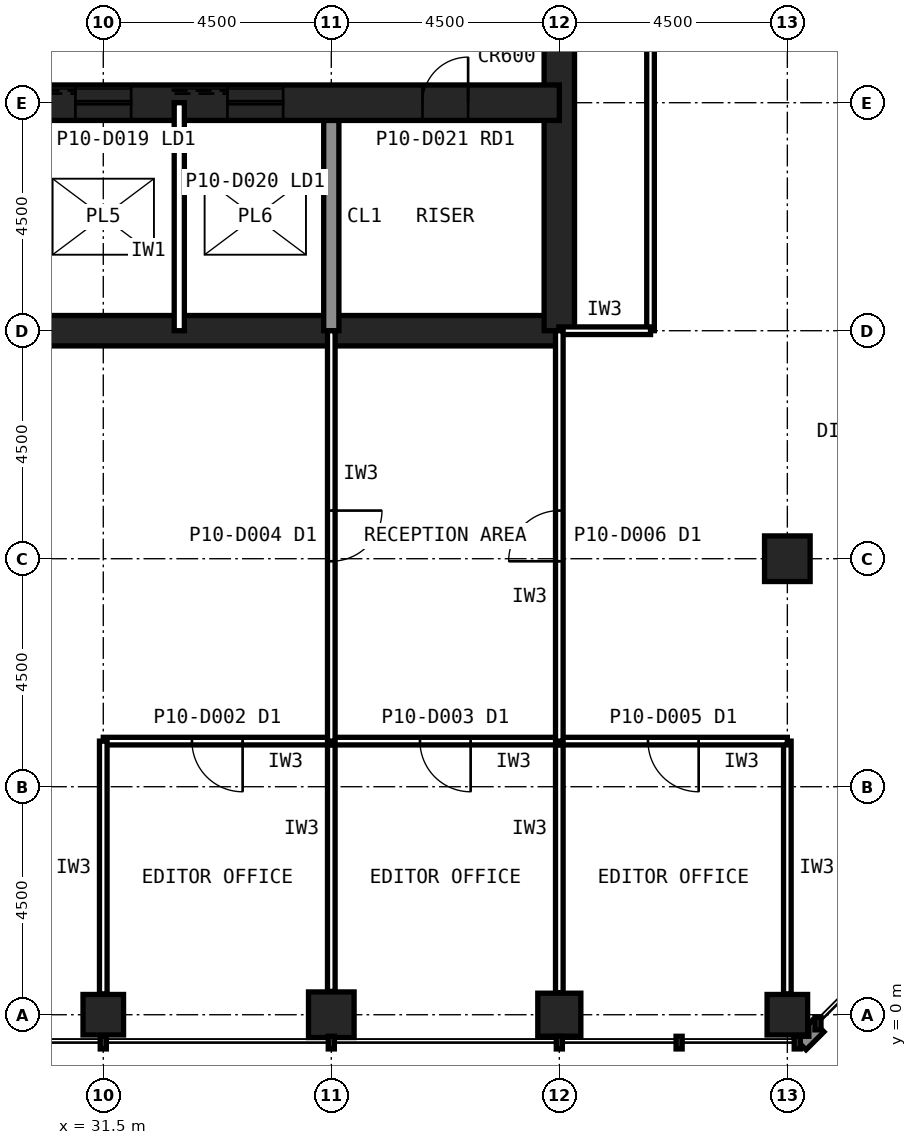
"""IFC4 building model, lengths in metres.
Left out: names, types, materials, properties, quantities, classifications, styles, units other than length and angle.
Written with IfcOpenShell. Run it as: python <this file> out.ifc"""

import sys

from ifc_helpers import new_model, si_unit, direction, frame, frame_2d, origin, origin_2d, place, context, subcontext, project, spatial, rectangle, hollow_rectangle, extrude, element, fill, save


model = new_model("IFC4")
c1 = context("Model", 3, precision=1e-05, world=origin(), true_north=direction((0.0, 1.0)))
c2 = subcontext(c1, "Body", "Model", "MODEL_VIEW")
j1 = project(units=[si_unit("LENGTHUNIT", "METRE"), si_unit("PLANEANGLEUNIT", "RADIAN")], contexts=[c1])
p1 = place(None, origin())
s1 = spatial("IfcSite", under=j1, at=p1, CompositionType="ELEMENT")
p2 = place(p1, origin())
s2 = spatial("IfcBuilding", under=s1, at=p2, CompositionType="ELEMENT")
p3 = place(p2, frame((0.0, 0.0, 45.8)))
s3 = spatial("IfcBuildingStorey", under=s2, at=p3, CompositionType="ELEMENT", Elevation=45.8)
p4 = place(p3, frame((31.5, 0.0, 0.0), z_axis=(0.0, 0.0, 1.0), x_axis=(1.0, 0.0, 0.0)))
e1 = element("IfcColumn", 1, at=p4, inside=s3, PredefinedType="COLUMN", context=c2, shape_type="SweptSolid", body=[
    extrude(hollow_rectangle(XDim=0.8, YDim=0.8, WallThickness=0.045, at=origin_2d()), origin(), (0.0, 0.0, 1.0), 4.2),
])
p5 = place(p3, frame((36.0, 0.0, 0.0), z_axis=(0.0, 0.0, 1.0), x_axis=(1.0, 0.0, 0.0)))
e2 = element("IfcColumn", 2, at=p5, inside=s3, PredefinedType="COLUMN", context=c2, shape_type="SweptSolid", body=[
    extrude(hollow_rectangle(XDim=0.9, YDim=0.9, WallThickness=0.063, at=origin_2d()), origin(), (0.0, 0.0, 1.0), 4.2),
])
p6 = place(p3, frame((40.5, 0.0, 0.0), z_axis=(0.0, 0.0, 1.0), x_axis=(1.0, 0.0, 0.0)))
e3 = element("IfcColumn", 3, at=p6, inside=s3, PredefinedType="COLUMN", context=c2, shape_type="SweptSolid", body=[
    extrude(hollow_rectangle(XDim=0.85, YDim=0.85, WallThickness=0.05, at=origin_2d()), origin(), (0.0, 0.0, 1.0), 4.2),
])
p7 = place(p3, frame((45.0, 0.0, 0.0), z_axis=(0.0, 0.0, 1.0), x_axis=(1.0, 0.0, 0.0)))
e4 = element("IfcColumn", 4, at=p7, inside=s3, PredefinedType="COLUMN", context=c2, shape_type="SweptSolid", body=[
    extrude(hollow_rectangle(XDim=0.8, YDim=0.8, WallThickness=0.045, at=origin_2d()), origin(), (0.0, 0.0, 1.0), 4.2),
])
p8 = place(p3, frame((45.0, 9.0, 0.0), z_axis=(0.0, 0.0, 1.0), x_axis=(1.0, 0.0, 0.0)))
e5 = element("IfcColumn", 5, at=p8, inside=s3, PredefinedType="COLUMN", context=c2, shape_type="SweptSolid", body=[
    extrude(hollow_rectangle(XDim=0.9, YDim=0.9, WallThickness=0.063, at=origin_2d()), origin(), (0.0, 0.0, 1.0), 4.2),
])
p9 = place(p3, frame((13.5, 13.5, 0.0), z_axis=(0.0, 0.0, 1.0), x_axis=(1.0, 0.0, 0.0)))
e6 = element("IfcWall", 6, at=p9, inside=s3, PredefinedType="SHEAR", context=c2, shape_type="SweptSolid", body=[
    extrude(rectangle(XDim=27.0, YDim=0.6, at=frame_2d((13.5, 0.0))), origin(), (0.0, 0.0, 1.0), 4.2),
])
p10 = place(p3, frame((40.5, 13.5, 0.0), z_axis=(0.0, 0.0, 1.0), x_axis=(0.0, 1.0, 0.0)))
e7 = element("IfcWall", 7, at=p10, inside=s3, PredefinedType="SHEAR", context=c2, shape_type="SweptSolid", body=[
    extrude(rectangle(XDim=27.0, YDim=0.6, at=frame_2d((13.5, 0.0))), origin(), (0.0, 0.0, 1.0), 4.2),
])
p11 = place(p10, frame((5.85, 0.0, 0.0)))
e8 = element("IfcOpeningElement", 8, at=p11, cuts=e7, PredefinedType="OPENING", context=c2, shape_type="SweptSolid", body=[
    extrude(rectangle(XDim=1.8, YDim=2.1, at=frame_2d((0.9, 1.05))), frame((0.0, 0.31, 0.0), z_axis=(0.0, -1.0, 0.0), x_axis=(1.0, 0.0, 0.0)), (0.0, 0.0, 1.0), 0.62),
])
p12 = place(p10, frame((19.65, 0.0, 0.0)))
e9 = element("IfcOpeningElement", 9, at=p12, cuts=e7, PredefinedType="OPENING", context=c2, shape_type="SweptSolid", body=[
    extrude(rectangle(XDim=1.2, YDim=2.1, at=frame_2d((0.6, 1.05))), frame((0.0, 0.31, 0.0), z_axis=(0.0, -1.0, 0.0), x_axis=(1.0, 0.0, 0.0)), (0.0, 0.0, 1.0), 0.62),
])
p13 = place(p3, frame((36.0, 13.5, 0.0), z_axis=(0.0, 0.0, 1.0), x_axis=(0.0, 1.0, 0.0)))
e10 = element("IfcWall", 10, at=p13, inside=s3, PredefinedType="SOLIDWALL", context=c2, shape_type="SweptSolid", body=[
    extrude(rectangle(XDim=4.5, YDim=0.3, at=frame_2d((2.25, 0.0))), origin(), (0.0, 0.0, 1.0), 4.04),
])
p14 = place(p3, frame((13.5, 18.0, 0.0), z_axis=(0.0, 0.0, 1.0), x_axis=(1.0, 0.0, 0.0)))
e11 = element("IfcWall", 11, at=p14, inside=s3, PredefinedType="SHEAR", context=c2, shape_type="SweptSolid", body=[
    extrude(rectangle(XDim=27.0, YDim=0.7, at=frame_2d((13.5, 0.0))), origin(), (0.0, 0.0, 1.0), 4.2),
])
p15 = place(p14, frame((24.3, 0.0, 0.0)))
e12 = element("IfcOpeningElement", 12, at=p15, cuts=e11, PredefinedType="OPENING", context=c2, shape_type="SweptSolid", body=[
    extrude(rectangle(XDim=0.9, YDim=2.1, at=frame_2d((0.45, 1.05))), frame((0.0, 0.36, 0.0), z_axis=(0.0, -1.0, 0.0), x_axis=(1.0, 0.0, 0.0)), (0.0, 0.0, 1.0), 0.72),
])
p16 = place(p14, frame((5.45, 0.0, 0.0)))
e13 = element("IfcOpeningElement", 13, at=p16, cuts=e11, PredefinedType="OPENING", context=c2, shape_type="SweptSolid", body=[
    extrude(rectangle(XDim=1.1, YDim=2.1, at=frame_2d((0.55, 1.05))), frame((0.0, 0.36, 0.0), z_axis=(0.0, -1.0, 0.0), x_axis=(1.0, 0.0, 0.0)), (0.0, 0.0, 1.0), 0.72),
])
p17 = place(p14, frame((8.45, 0.0, 0.0)))
e14 = element("IfcOpeningElement", 14, at=p17, cuts=e11, PredefinedType="OPENING", context=c2, shape_type="SweptSolid", body=[
    extrude(rectangle(XDim=1.1, YDim=2.1, at=frame_2d((0.55, 1.05))), frame((0.0, 0.36, 0.0), z_axis=(0.0, -1.0, 0.0), x_axis=(1.0, 0.0, 0.0)), (0.0, 0.0, 1.0), 0.72),
])
p18 = place(p14, frame((11.45, 0.0, 0.0)))
e15 = element("IfcOpeningElement", 15, at=p18, cuts=e11, PredefinedType="OPENING", context=c2, shape_type="SweptSolid", body=[
    extrude(rectangle(XDim=1.1, YDim=2.1, at=frame_2d((0.55, 1.05))), frame((0.0, 0.36, 0.0), z_axis=(0.0, -1.0, 0.0), x_axis=(1.0, 0.0, 0.0)), (0.0, 0.0, 1.0), 0.72),
])
p19 = place(p14, frame((14.45, 0.0, 0.0)))
e16 = element("IfcOpeningElement", 16, at=p19, cuts=e11, PredefinedType="OPENING", context=c2, shape_type="SweptSolid", body=[
    extrude(rectangle(XDim=1.1, YDim=2.1, at=frame_2d((0.55, 1.05))), frame((0.0, 0.36, 0.0), z_axis=(0.0, -1.0, 0.0), x_axis=(1.0, 0.0, 0.0)), (0.0, 0.0, 1.0), 0.72),
])
p20 = place(p14, frame((17.45, 0.0, 0.0)))
e17 = element("IfcOpeningElement", 17, at=p20, cuts=e11, PredefinedType="OPENING", context=c2, shape_type="SweptSolid", body=[
    extrude(rectangle(XDim=1.1, YDim=2.1, at=frame_2d((0.55, 1.05))), frame((0.0, 0.36, 0.0), z_axis=(0.0, -1.0, 0.0), x_axis=(1.0, 0.0, 0.0)), (0.0, 0.0, 1.0), 0.72),
])
p21 = place(p14, frame((20.45, 0.0, 0.0)))
e18 = element("IfcOpeningElement", 18, at=p21, cuts=e11, PredefinedType="OPENING", context=c2, shape_type="SweptSolid", body=[
    extrude(rectangle(XDim=1.1, YDim=2.1, at=frame_2d((0.55, 1.05))), frame((0.0, 0.36, 0.0), z_axis=(0.0, -1.0, 0.0), x_axis=(1.0, 0.0, 0.0)), (0.0, 0.0, 1.0), 0.72),
])
p22 = place(p14, frame((1.6, 0.0, 0.0)))
e19 = element("IfcOpeningElement", 19, at=p22, cuts=e11, PredefinedType="OPENING", context=c2, shape_type="SweptSolid", body=[
    extrude(rectangle(XDim=1.3, YDim=2.2, at=frame_2d((0.65, 1.1))), frame((0.0, 0.36, 0.0), z_axis=(0.0, -1.0, 0.0), x_axis=(1.0, 0.0, 0.0)), (0.0, 0.0, 1.0), 0.72),
])
p23 = place(p3, frame((33.0, 13.5, 0.0), z_axis=(0.0, 0.0, 1.0), x_axis=(0.0, 1.0, 0.0)))
e20 = element("IfcWall", 20, at=p23, inside=s3, PredefinedType="PARTITIONING", context=c2, shape_type="SweptSolid", body=[
    extrude(rectangle(XDim=4.5, YDim=0.2, at=frame_2d((2.25, 0.0))), origin(), (0.0, 0.0, 1.0), 4.04),
])
p24 = place(p3, frame((42.3, 13.5, 0.0), z_axis=(0.0, 0.0, 1.0), x_axis=(0.0, 1.0, 0.0)))
e21 = element("IfcWall", 21, at=p24, inside=s3, PredefinedType="PARTITIONING", context=c2, shape_type="SweptSolid", body=[
    extrude(rectangle(XDim=28.8, YDim=0.15, at=frame_2d((14.4, 0.0))), origin(), (0.0, 0.0, 1.0), 4.04),
])
p25 = place(p24, frame((13.9, 0.0, 0.0)))
e22 = element("IfcOpeningElement", 22, at=p25, cuts=e21, PredefinedType="OPENING", context=c2, shape_type="SweptSolid", body=[
    extrude(rectangle(XDim=1.0, YDim=2.1, at=frame_2d((0.5, 1.05))), frame((0.0, 0.085, 0.0), z_axis=(0.0, -1.0, 0.0), x_axis=(1.0, 0.0, 0.0)), (0.0, 0.0, 1.0), 0.17),
])
p26 = place(p3, frame((40.49, 13.5, 0.0), z_axis=(0.0, 0.0, 1.0), x_axis=(1.0, 0.0, 0.0)))
e23 = element("IfcWall", 23, at=p26, inside=s3, PredefinedType="PARTITIONING", context=c2, shape_type="SweptSolid", body=[
    extrude(rectangle(XDim=1.81, YDim=0.15, at=frame_2d((0.905, 0.0))), origin(), (0.0, 0.0, 1.0), 3.189),
])
p27 = place(p3, frame((36.0, 0.46, 0.0), z_axis=(0.0, 0.0, 1.0), x_axis=(0.0, 1.0, 0.0)))
e24 = element("IfcWall", 24, at=p27, inside=s3, PredefinedType="PARTITIONING", context=c2, shape_type="SweptSolid", body=[
    extrude(rectangle(XDim=4.94, YDim=0.15, at=frame_2d((2.47, 0.0))), origin(), (0.0, 0.0, 1.0), 3.189),
])
p28 = place(p3, frame((36.0, 5.4, 0.0), z_axis=(0.0, 0.0, 1.0), x_axis=(-1.0, 0.0, 0.0)))
e25 = element("IfcWall", 25, at=p28, inside=s3, PredefinedType="PARTITIONING", context=c2, shape_type="SweptSolid", body=[
    extrude(rectangle(XDim=4.5, YDim=0.15, at=frame_2d((2.25, 0.0))), origin(), (0.0, 0.0, 1.0), 4.04),
])
p29 = place(p28, frame((1.75, 0.0, 0.0)))
e26 = element("IfcOpeningElement", 26, at=p29, cuts=e25, PredefinedType="OPENING", context=c2, shape_type="SweptSolid", body=[
    extrude(rectangle(XDim=1.0, YDim=2.1, at=frame_2d((0.5, 1.05))), frame((0.0, 0.085, 0.0), z_axis=(0.0, -1.0, 0.0), x_axis=(1.0, 0.0, 0.0)), (0.0, 0.0, 1.0), 0.17),
])
p30 = place(p3, frame((31.5, 5.4, 0.0), z_axis=(0.0, 0.0, 1.0), x_axis=(0.0, -1.0, 0.0)))
e27 = element("IfcWall", 27, at=p30, inside=s3, PredefinedType="PARTITIONING", context=c2, shape_type="SweptSolid", body=[
    extrude(rectangle(XDim=4.99, YDim=0.15, at=frame_2d((2.495, 0.0))), origin(), (0.0, 0.0, 1.0), 3.189),
])
p31 = place(p3, frame((40.5, 0.435, 0.0), z_axis=(0.0, 0.0, 1.0), x_axis=(0.0, 1.0, 0.0)))
e28 = element("IfcWall", 28, at=p31, inside=s3, PredefinedType="PARTITIONING", context=c2, shape_type="SweptSolid", body=[
    extrude(rectangle(XDim=4.965, YDim=0.15, at=frame_2d((2.482, 0.0))), origin(), (0.0, 0.0, 1.0), 3.189),
])
p32 = place(p3, frame((40.5, 5.4, 0.0), z_axis=(0.0, 0.0, 1.0), x_axis=(-1.0, 0.0, 0.0)))
e29 = element("IfcWall", 29, at=p32, inside=s3, PredefinedType="PARTITIONING", context=c2, shape_type="SweptSolid", body=[
    extrude(rectangle(XDim=4.5, YDim=0.15, at=frame_2d((2.25, 0.0))), origin(), (0.0, 0.0, 1.0), 4.04),
])
p33 = place(p32, frame((1.75, 0.0, 0.0)))
e30 = element("IfcOpeningElement", 30, at=p33, cuts=e29, PredefinedType="OPENING", context=c2, shape_type="SweptSolid", body=[
    extrude(rectangle(XDim=1.0, YDim=2.1, at=frame_2d((0.5, 1.05))), frame((0.0, 0.085, 0.0), z_axis=(0.0, -1.0, 0.0), x_axis=(1.0, 0.0, 0.0)), (0.0, 0.0, 1.0), 0.17),
])
p34 = place(p3, frame((45.0, 0.41, 0.0), z_axis=(0.0, 0.0, 1.0), x_axis=(0.0, 1.0, 0.0)))
e31 = element("IfcWall", 31, at=p34, inside=s3, PredefinedType="PARTITIONING", context=c2, shape_type="SweptSolid", body=[
    extrude(rectangle(XDim=4.99, YDim=0.15, at=frame_2d((2.495, 0.0))), origin(), (0.0, 0.0, 1.0), 3.429),
])
p35 = place(p3, frame((45.0, 5.4, 0.0), z_axis=(0.0, 0.0, 1.0), x_axis=(-1.0, 0.0, 0.0)))
e32 = element("IfcWall", 32, at=p35, inside=s3, PredefinedType="PARTITIONING", context=c2, shape_type="SweptSolid", body=[
    extrude(rectangle(XDim=4.5, YDim=0.15, at=frame_2d((2.25, 0.0))), origin(), (0.0, 0.0, 1.0), 4.04),
])
p36 = place(p35, frame((1.75, 0.0, 0.0)))
e33 = element("IfcOpeningElement", 33, at=p36, cuts=e32, PredefinedType="OPENING", context=c2, shape_type="SweptSolid", body=[
    extrude(rectangle(XDim=1.0, YDim=2.1, at=frame_2d((0.5, 1.05))), frame((0.0, 0.085, 0.0), z_axis=(0.0, -1.0, 0.0), x_axis=(1.0, 0.0, 0.0)), (0.0, 0.0, 1.0), 0.17),
])
p37 = place(p3, frame((40.5, 5.4, 0.0), z_axis=(0.0, 0.0, 1.0), x_axis=(0.0, 1.0, 0.0)))
e34 = element("IfcWall", 34, at=p37, inside=s3, PredefinedType="PARTITIONING", context=c2, shape_type="SweptSolid", body=[
    extrude(rectangle(XDim=8.1, YDim=0.15, at=frame_2d((4.05, 0.0))), origin(), (0.0, 0.0, 1.0), 3.189),
])
p38 = place(p37, frame((3.55, 0.0, 0.0)))
e35 = element("IfcOpeningElement", 35, at=p38, cuts=e34, PredefinedType="OPENING", context=c2, shape_type="SweptSolid", body=[
    extrude(rectangle(XDim=1.0, YDim=2.1, at=frame_2d((0.5, 1.05))), frame((0.0, 0.085, 0.0), z_axis=(0.0, -1.0, 0.0), x_axis=(1.0, 0.0, 0.0)), (0.0, 0.0, 1.0), 0.17),
])
p39 = place(p3, frame((36.0, 13.5, 0.0), z_axis=(0.0, 0.0, 1.0), x_axis=(0.0, -1.0, 0.0)))
e36 = element("IfcWall", 36, at=p39, inside=s3, PredefinedType="PARTITIONING", context=c2, shape_type="SweptSolid", body=[
    extrude(rectangle(XDim=8.1, YDim=0.15, at=frame_2d((4.05, 0.0))), origin(), (0.0, 0.0, 1.0), 3.189),
])
p40 = place(p39, frame((3.55, 0.0, 0.0)))
e37 = element("IfcOpeningElement", 37, at=p40, cuts=e36, PredefinedType="OPENING", context=c2, shape_type="SweptSolid", body=[
    extrude(rectangle(XDim=1.0, YDim=2.1, at=frame_2d((0.5, 1.05))), frame((0.0, 0.085, 0.0), z_axis=(0.0, -1.0, 0.0), x_axis=(1.0, 0.0, 0.0)), (0.0, 0.0, 1.0), 0.17),
])
p41 = place(p15, origin())
e38 = element("IfcDoor", 38, at=p41, inside=s3, OperationType="SINGLE_SWING_RIGHT", PredefinedType="DOOR", context=c2, shape_type="SweptSolid", body=[
    extrude(rectangle(XDim=0.9, YDim=2.1, at=frame_2d((0.45, 1.05))), frame((0.0, 0.025, 0.0), z_axis=(0.0, -1.0, 0.0), x_axis=(1.0, 0.0, 0.0)), (0.0, 0.0, 1.0), 0.05),
])
fill(e12, e38)
p42 = place(p20, origin())
e39 = element("IfcDoor", 39, at=p42, inside=s3, OperationType="SLIDING_TO_LEFT", PredefinedType="DOOR", context=c2, shape_type="SweptSolid", body=[
    extrude(rectangle(XDim=1.1, YDim=2.1, at=frame_2d((0.55, 1.05))), frame((0.0, 0.025, 0.0), z_axis=(0.0, -1.0, 0.0), x_axis=(1.0, 0.0, 0.0)), (0.0, 0.0, 1.0), 0.05),
])
fill(e17, e39)
p43 = place(p21, origin())
e40 = element("IfcDoor", 40, at=p43, inside=s3, OperationType="SLIDING_TO_LEFT", PredefinedType="DOOR", context=c2, shape_type="SweptSolid", body=[
    extrude(rectangle(XDim=1.1, YDim=2.1, at=frame_2d((0.55, 1.05))), frame((0.0, 0.025, 0.0), z_axis=(0.0, -1.0, 0.0), x_axis=(1.0, 0.0, 0.0)), (0.0, 0.0, 1.0), 0.05),
])
fill(e18, e40)
p44 = place(p29, origin())
e41 = element("IfcDoor", 41, at=p44, inside=s3, OperationType="SINGLE_SWING_LEFT", PredefinedType="DOOR", context=c2, shape_type="SweptSolid", body=[
    extrude(rectangle(XDim=1.0, YDim=2.1, at=frame_2d((0.5, 1.05))), frame((0.0, 0.025, 0.0), z_axis=(0.0, -1.0, 0.0), x_axis=(1.0, 0.0, 0.0)), (0.0, 0.0, 1.0), 0.05),
])
fill(e26, e41)
p45 = place(p33, origin())
e42 = element("IfcDoor", 42, at=p45, inside=s3, OperationType="SINGLE_SWING_LEFT", PredefinedType="DOOR", context=c2, shape_type="SweptSolid", body=[
    extrude(rectangle(XDim=1.0, YDim=2.1, at=frame_2d((0.5, 1.05))), frame((0.0, 0.025, 0.0), z_axis=(0.0, -1.0, 0.0), x_axis=(1.0, 0.0, 0.0)), (0.0, 0.0, 1.0), 0.05),
])
fill(e30, e42)
p46 = place(p36, origin())
e43 = element("IfcDoor", 43, at=p46, inside=s3, OperationType="SINGLE_SWING_LEFT", PredefinedType="DOOR", context=c2, shape_type="SweptSolid", body=[
    extrude(rectangle(XDim=1.0, YDim=2.1, at=frame_2d((0.5, 1.05))), frame((0.0, 0.025, 0.0), z_axis=(0.0, -1.0, 0.0), x_axis=(1.0, 0.0, 0.0)), (0.0, 0.0, 1.0), 0.05),
])
fill(e33, e43)
p47 = place(p38, origin())
e44 = element("IfcDoor", 44, at=p47, inside=s3, OperationType="SINGLE_SWING_LEFT", PredefinedType="DOOR", context=c2, shape_type="SweptSolid", body=[
    extrude(rectangle(XDim=1.0, YDim=2.1, at=frame_2d((0.5, 1.05))), frame((0.0, 0.025, 0.0), z_axis=(0.0, -1.0, 0.0), x_axis=(1.0, 0.0, 0.0)), (0.0, 0.0, 1.0), 0.05),
])
fill(e35, e44)
p48 = place(p40, origin())
e45 = element("IfcDoor", 45, at=p48, inside=s3, OperationType="SINGLE_SWING_LEFT", PredefinedType="DOOR", context=c2, shape_type="SweptSolid", body=[
    extrude(rectangle(XDim=1.0, YDim=2.1, at=frame_2d((0.5, 1.05))), frame((0.0, 0.025, 0.0), z_axis=(0.0, -1.0, 0.0), x_axis=(1.0, 0.0, 0.0)), (0.0, 0.0, 1.0), 0.05),
])
fill(e37, e45)
save(model, sys.argv[1])
